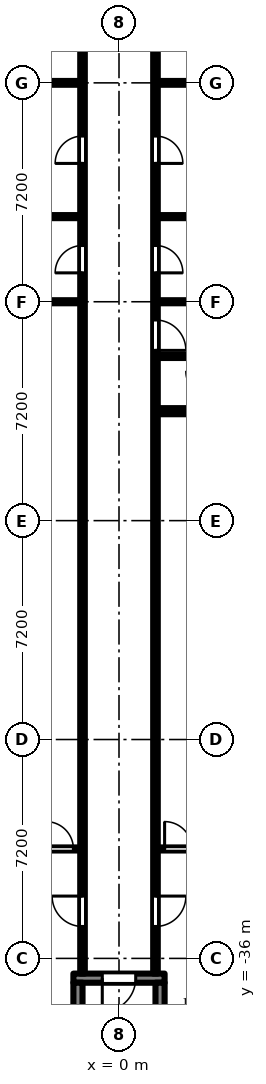
"""IFC4 building model, lengths in metres.
Left out: names, types, materials, properties, quantities, classifications, styles, units other than length and angle.
Written with IfcOpenShell. Run it as: python <this file> out.ifc"""

import sys

from ifc_helpers import new_model, si_unit, direction, frame, frame_2d, origin, place, context, subcontext, project, spatial, rectangle, extrude, element, fill, save


model = new_model("IFC4")
c1 = context("Model", 3, precision=1e-05, world=origin(), true_north=direction((0.0, 1.0)))
c2 = subcontext(c1, "Body", "Model", "MODEL_VIEW")
j1 = project(units=[si_unit("LENGTHUNIT", "METRE"), si_unit("PLANEANGLEUNIT", "RADIAN")], contexts=[c1])
p1 = place(None, origin())
s1 = spatial("IfcSite", under=j1, at=p1, CompositionType="ELEMENT")
p2 = place(p1, origin())
s2 = spatial("IfcBuilding", under=s1, at=p2, CompositionType="ELEMENT")
p3 = place(p2, frame((0.0, 0.0, 66.9)))
s3 = spatial("IfcBuildingStorey", under=s2, at=p3, CompositionType="ELEMENT", Elevation=66.9)
p4 = place(p3, frame((-1.5, -36.65, 0.0), z_axis=(0.0, 0.0, 1.0), x_axis=(1.0, 0.0, 0.0)))
e1 = element("IfcWall", 1, at=p4, inside=s3, PredefinedType="SHEAR", context=c2, shape_type="SweptSolid", body=[
    extrude(rectangle(XDim=3.0, YDim=0.3, at=frame_2d((1.5, 0.0))), origin(), (0.0, 0.0, 1.0), 2.575),
])
p5 = place(p4, frame((0.95, 0.0, 0.0)))
e2 = element("IfcOpeningElement", 2, at=p5, cuts=e1, PredefinedType="OPENING", context=c2, shape_type="SweptSolid", body=[
    extrude(rectangle(XDim=1.1, YDim=2.1, at=frame_2d((0.55, 1.05))), frame((0.0, 0.16, 0.0), z_axis=(0.0, -1.0, 0.0), x_axis=(1.0, 0.0, 0.0)), (0.0, 0.0, 1.0), 0.32),
])
for number, where, z_axis, x_axis in (
    (3, (-1.35, -36.8, 0.0), (0.0, 0.0, 1.0), (0.0, -1.0, 0.0)),
    (4, (1.35, -36.8, 0.0), (0.0, 0.0, 1.0), (0.0, -1.0, 0.0)),
):
    element("IfcWall", number, at=place(p3, frame(where, z_axis=z_axis, x_axis=x_axis)), inside=s3, PredefinedType="SHEAR", context=c2, shape_type="SweptSolid", body=[
        extrude(rectangle(XDim=5.8, YDim=0.3, at=frame_2d((2.9, 0.0))), origin(), (0.0, 0.0, 1.0), 2.575),
    ])
p6 = place(p3, frame((-6.9, -32.4, 0.0), z_axis=(0.0, 0.0, 1.0), x_axis=(1.0, 0.0, 0.0)))
e5 = element("IfcWall", 5, at=p6, inside=s3, PredefinedType="PARTITIONING", context=c2, shape_type="SweptSolid", body=[
    extrude(rectangle(XDim=5.625, YDim=0.1, at=frame_2d((2.812, 0.0))), origin(), (0.0, 0.0, 1.0), 2.575),
])
p7 = place(p6, frame((4.5, 0.0, 0.0)))
e6 = element("IfcOpeningElement", 6, at=p7, cuts=e5, PredefinedType="OPENING", context=c2, shape_type="SweptSolid", body=[
    extrude(rectangle(XDim=0.9, YDim=2.1, at=frame_2d((0.45, 1.05))), frame((0.0, 0.06, 0.0), z_axis=(0.0, -1.0, 0.0), x_axis=(1.0, 0.0, 0.0)), (0.0, 0.0, 1.0), 0.12),
])
p8 = place(p3, frame((-3.9, -11.6, 0.0), z_axis=(0.0, 0.0, 1.0), x_axis=(1.0, 0.0, 0.0)))
e7 = element("IfcWall", 7, at=p8, inside=s3, PredefinedType="PARTITIONING", context=c2, shape_type="SweptSolid", body=[
    extrude(rectangle(XDim=2.625, YDim=0.1, at=frame_2d((1.312, 0.0))), origin(), (0.0, 0.0, 1.0), 2.575),
])
p9 = place(p3, frame((-3.9, -7.2, 0.0), z_axis=(0.0, 0.0, 1.0), x_axis=(1.0, 0.0, 0.0)))
e8 = element("IfcWall", 8, at=p9, inside=s3, PredefinedType="PARTITIONING", context=c2, shape_type="SweptSolid", body=[
    extrude(rectangle(XDim=2.625, YDim=0.125, at=frame_2d((1.312, 0.0))), origin(), (0.0, 0.0, 1.0), 2.575),
])
p10 = place(p3, frame((-2.7, -14.4, 0.0), z_axis=(0.0, 0.0, 1.0), x_axis=(1.0, 0.0, 0.0)))
e9 = element("IfcWall", 9, at=p10, inside=s3, PredefinedType="PARTITIONING", context=c2, shape_type="SweptSolid", body=[
    extrude(rectangle(XDim=1.425, YDim=0.1, at=frame_2d((0.712, 0.0))), origin(), (0.0, 0.0, 1.0), 2.575),
])
p11 = place(p3, frame((-1.2, -36.5, 0.0), z_axis=(0.0, 0.0, 1.0), x_axis=(0.0, 1.0, 0.0)))
e10 = element("IfcWall", 10, at=p11, inside=s3, PredefinedType="PARTITIONING", context=c2, shape_type="SweptSolid", body=[
    extrude(rectangle(XDim=35.225, YDim=0.15, at=frame_2d((17.613, 0.0))), origin(), (0.0, 0.0, 1.0), 2.575),
])
p12 = place(p11, frame((31.85, 0.0, 0.0)))
e11 = element("IfcOpeningElement", 11, at=p12, cuts=e10, PredefinedType="OPENING", context=c2, shape_type="SweptSolid", body=[
    extrude(rectangle(XDim=0.9, YDim=2.1, at=frame_2d((0.45, 1.05))), frame((0.0, 0.085, 0.0), z_axis=(0.0, -1.0, 0.0), x_axis=(1.0, 0.0, 0.0)), (0.0, 0.0, 1.0), 0.17),
])
p13 = place(p11, frame((23.05, 0.0, 0.0)))
e12 = element("IfcOpeningElement", 12, at=p13, cuts=e10, PredefinedType="OPENING", context=c2, shape_type="SweptSolid", body=[
    extrude(rectangle(XDim=0.9, YDim=2.1, at=frame_2d((0.45, 1.05))), frame((0.0, 0.085, 0.0), z_axis=(0.0, -1.0, 0.0), x_axis=(1.0, 0.0, 0.0)), (0.0, 0.0, 1.0), 0.17),
])
p14 = place(p11, frame((26.65, 0.0, 0.0)))
e13 = element("IfcOpeningElement", 13, at=p14, cuts=e10, PredefinedType="OPENING", context=c2, shape_type="SweptSolid", body=[
    extrude(rectangle(XDim=0.9, YDim=2.1, at=frame_2d((0.45, 1.05))), frame((0.0, 0.085, 0.0), z_axis=(0.0, -1.0, 0.0), x_axis=(1.0, 0.0, 0.0)), (0.0, 0.0, 1.0), 0.17),
])
p15 = place(p11, frame((1.55, 0.0, 0.0)))
e14 = element("IfcOpeningElement", 14, at=p15, cuts=e10, PredefinedType="OPENING", context=c2, shape_type="SweptSolid", body=[
    extrude(rectangle(XDim=1.0, YDim=2.1, at=frame_2d((0.5, 1.05))), frame((0.0, 0.085, 0.0), z_axis=(0.0, -1.0, 0.0), x_axis=(1.0, 0.0, 0.0)), (0.0, 0.0, 1.0), 0.17),
])
p16 = place(p3, frame((1.2, -36.5, 0.0), z_axis=(0.0, 0.0, 1.0), x_axis=(0.0, 1.0, 0.0)))
e15 = element("IfcWall", 15, at=p16, inside=s3, PredefinedType="PARTITIONING", context=c2, shape_type="SweptSolid", body=[
    extrude(rectangle(XDim=35.375, YDim=0.15, at=frame_2d((17.688, 0.0))), origin(), (0.0, 0.0, 1.0), 2.575),
])
p17 = place(p16, frame((31.85, 0.0, 0.0)))
e16 = element("IfcOpeningElement", 16, at=p17, cuts=e15, PredefinedType="OPENING", context=c2, shape_type="SweptSolid", body=[
    extrude(rectangle(XDim=0.9, YDim=2.1, at=frame_2d((0.45, 1.05))), frame((0.0, 0.085, 0.0), z_axis=(0.0, -1.0, 0.0), x_axis=(1.0, 0.0, 0.0)), (0.0, 0.0, 1.0), 0.17),
])
p18 = place(p16, frame((23.05, 0.0, 0.0)))
e17 = element("IfcOpeningElement", 17, at=p18, cuts=e15, PredefinedType="OPENING", context=c2, shape_type="SweptSolid", body=[
    extrude(rectangle(XDim=0.9, YDim=2.1, at=frame_2d((0.45, 1.05))), frame((0.0, 0.085, 0.0), z_axis=(0.0, -1.0, 0.0), x_axis=(1.0, 0.0, 0.0)), (0.0, 0.0, 1.0), 0.17),
])
p19 = place(p16, frame((26.65, 0.0, 0.0)))
e18 = element("IfcOpeningElement", 18, at=p19, cuts=e15, PredefinedType="OPENING", context=c2, shape_type="SweptSolid", body=[
    extrude(rectangle(XDim=0.9, YDim=2.1, at=frame_2d((0.45, 1.05))), frame((0.0, 0.085, 0.0), z_axis=(0.0, -1.0, 0.0), x_axis=(1.0, 0.0, 0.0)), (0.0, 0.0, 1.0), 0.17),
])
p20 = place(p16, frame((20.5, 0.0, 0.0)))
e19 = element("IfcOpeningElement", 19, at=p20, cuts=e15, PredefinedType="OPENING", context=c2, shape_type="SweptSolid", body=[
    extrude(rectangle(XDim=1.0, YDim=2.1, at=frame_2d((0.5, 1.05))), frame((0.0, 0.085, 0.0), z_axis=(0.0, -1.0, 0.0), x_axis=(1.0, 0.0, 0.0)), (0.0, 0.0, 1.0), 0.17),
])
p21 = place(p16, frame((1.55, 0.0, 0.0)))
e20 = element("IfcOpeningElement", 20, at=p21, cuts=e15, PredefinedType="OPENING", context=c2, shape_type="SweptSolid", body=[
    extrude(rectangle(XDim=1.0, YDim=2.1, at=frame_2d((0.5, 1.05))), frame((0.0, 0.085, 0.0), z_axis=(0.0, -1.0, 0.0), x_axis=(1.0, 0.0, 0.0)), (0.0, 0.0, 1.0), 0.17),
])
p22 = place(p3, frame((1.275, -32.4, 0.0), z_axis=(0.0, 0.0, 1.0), x_axis=(1.0, 0.0, 0.0)))
e21 = element("IfcWall", 21, at=p22, inside=s3, PredefinedType="PARTITIONING", context=c2, shape_type="SweptSolid", body=[
    extrude(rectangle(XDim=5.625, YDim=0.1, at=frame_2d((2.812, 0.0))), origin(), (0.0, 0.0, 1.0), 2.575),
])
p23 = place(p22, frame((0.225, 0.0, 0.0)))
e22 = element("IfcOpeningElement", 22, at=p23, cuts=e21, PredefinedType="OPENING", context=c2, shape_type="SweptSolid", body=[
    extrude(rectangle(XDim=0.9, YDim=2.1, at=frame_2d((0.45, 1.05))), frame((0.0, 0.06, 0.0), z_axis=(0.0, -1.0, 0.0), x_axis=(1.0, 0.0, 0.0)), (0.0, 0.0, 1.0), 0.12),
])
p24 = place(p3, frame((1.275, -18.0, 0.0), z_axis=(0.0, 0.0, 1.0), x_axis=(1.0, 0.0, 0.0)))
e23 = element("IfcWall", 23, at=p24, inside=s3, PredefinedType="PARTITIONING", context=c2, shape_type="SweptSolid", body=[
    extrude(rectangle(XDim=1.475, YDim=0.2, at=frame_2d((0.738, 0.0))), origin(), (0.0, 0.0, 1.0), 2.575),
])
p25 = place(p3, frame((1.275, -16.2, 0.0), z_axis=(0.0, 0.0, 1.0), x_axis=(1.0, 0.0, 0.0)))
e24 = element("IfcWall", 24, at=p25, inside=s3, PredefinedType="PARTITIONING", context=c2, shape_type="SweptSolid", body=[
    extrude(rectangle(XDim=1.775, YDim=0.1, at=frame_2d((0.888, 0.0))), origin(), (0.0, 0.0, 1.0), 2.575),
])
for number, where, z_axis, x_axis in (
    (25, (1.275, -14.4, 0.0), (0.0, 0.0, 1.0), (1.0, 0.0, 0.0)),
    (26, (1.275, -11.6, 0.0), (0.0, 0.0, 1.0), (1.0, 0.0, 0.0)),
):
    element("IfcWall", number, at=place(p3, frame(where, z_axis=z_axis, x_axis=x_axis)), inside=s3, PredefinedType="PARTITIONING", context=c2, shape_type="SweptSolid", body=[
        extrude(rectangle(XDim=2.625, YDim=0.1, at=frame_2d((1.312, 0.0))), origin(), (0.0, 0.0, 1.0), 2.575),
    ])
p26 = place(p3, frame((1.275, -7.2, 0.0), z_axis=(0.0, 0.0, 1.0), x_axis=(1.0, 0.0, 0.0)))
e27 = element("IfcWall", 27, at=p26, inside=s3, PredefinedType="PARTITIONING", context=c2, shape_type="SweptSolid", body=[
    extrude(rectangle(XDim=2.625, YDim=0.125, at=frame_2d((1.312, 0.0))), origin(), (0.0, 0.0, 1.0), 2.575),
])
p27 = place(p5, frame((1.1, 0.0, 0.0), z_axis=(0.0, 0.0, 1.0), x_axis=(-1.0, 0.0, 0.0)))
e28 = element("IfcDoor", 28, at=p27, inside=s3, OperationType="SINGLE_SWING_RIGHT", PredefinedType="DOOR", context=c2, shape_type="SweptSolid", body=[
    extrude(rectangle(XDim=1.1, YDim=2.1, at=frame_2d((0.55, 1.05))), frame((0.0, 0.025, 0.0), z_axis=(0.0, -1.0, 0.0), x_axis=(1.0, 0.0, 0.0)), (0.0, 0.0, 1.0), 0.05),
])
fill(e2, e28)
p28 = place(p18, frame((0.9, 0.0, 0.0), z_axis=(0.0, 0.0, 1.0), x_axis=(-1.0, 0.0, 0.0)))
e29 = element("IfcDoor", 29, at=p28, inside=s3, OperationType="SINGLE_SWING_RIGHT", PredefinedType="DOOR", context=c2, shape_type="SweptSolid", body=[
    extrude(rectangle(XDim=0.9, YDim=2.1, at=frame_2d((0.45, 1.05))), frame((0.0, 0.025, 0.0), z_axis=(0.0, -1.0, 0.0), x_axis=(1.0, 0.0, 0.0)), (0.0, 0.0, 1.0), 0.05),
])
fill(e17, e29)
p29 = place(p19, frame((0.9, 0.0, 0.0), z_axis=(0.0, 0.0, 1.0), x_axis=(-1.0, 0.0, 0.0)))
e30 = element("IfcDoor", 30, at=p29, inside=s3, OperationType="SINGLE_SWING_RIGHT", PredefinedType="DOOR", context=c2, shape_type="SweptSolid", body=[
    extrude(rectangle(XDim=0.9, YDim=2.1, at=frame_2d((0.45, 1.05))), frame((0.0, 0.025, 0.0), z_axis=(0.0, -1.0, 0.0), x_axis=(1.0, 0.0, 0.0)), (0.0, 0.0, 1.0), 0.05),
])
fill(e18, e30)
p30 = place(p20, frame((1.0, 0.0, 0.0), z_axis=(0.0, 0.0, 1.0), x_axis=(-1.0, 0.0, 0.0)))
e31 = element("IfcDoor", 31, at=p30, inside=s3, OperationType="SINGLE_SWING_RIGHT", PredefinedType="DOOR", context=c2, shape_type="SweptSolid", body=[
    extrude(rectangle(XDim=1.0, YDim=2.1, at=frame_2d((0.5, 1.05))), frame((0.0, 0.025, 0.0), z_axis=(0.0, -1.0, 0.0), x_axis=(1.0, 0.0, 0.0)), (0.0, 0.0, 1.0), 0.05),
])
fill(e19, e31)
p31 = place(p21, frame((1.0, 0.0, 0.0), z_axis=(0.0, 0.0, 1.0), x_axis=(-1.0, 0.0, 0.0)))
e32 = element("IfcDoor", 32, at=p31, inside=s3, OperationType="SINGLE_SWING_LEFT", PredefinedType="DOOR", context=c2, shape_type="SweptSolid", body=[
    extrude(rectangle(XDim=1.0, YDim=2.1, at=frame_2d((0.5, 1.05))), frame((0.0, 0.025, 0.0), z_axis=(0.0, -1.0, 0.0), x_axis=(1.0, 0.0, 0.0)), (0.0, 0.0, 1.0), 0.05),
])
fill(e20, e32)
p32 = place(p23, origin())
e33 = element("IfcDoor", 33, at=p32, inside=s3, OperationType="SINGLE_SWING_LEFT", PredefinedType="DOOR", context=c2, shape_type="SweptSolid", body=[
    extrude(rectangle(XDim=0.9, YDim=2.1, at=frame_2d((0.45, 1.05))), frame((0.0, 0.025, 0.0), z_axis=(0.0, -1.0, 0.0), x_axis=(1.0, 0.0, 0.0)), (0.0, 0.0, 1.0), 0.05),
])
fill(e22, e33)
p33 = place(p13, origin())
e34 = element("IfcDoor", 34, at=p33, inside=s3, OperationType="SINGLE_SWING_LEFT", PredefinedType="DOOR", context=c2, shape_type="SweptSolid", body=[
    extrude(rectangle(XDim=0.9, YDim=2.1, at=frame_2d((0.45, 1.05))), frame((0.0, 0.025, 0.0), z_axis=(0.0, -1.0, 0.0), x_axis=(1.0, 0.0, 0.0)), (0.0, 0.0, 1.0), 0.05),
])
fill(e12, e34)
p34 = place(p14, origin())
e35 = element("IfcDoor", 35, at=p34, inside=s3, OperationType="SINGLE_SWING_LEFT", PredefinedType="DOOR", context=c2, shape_type="SweptSolid", body=[
    extrude(rectangle(XDim=0.9, YDim=2.1, at=frame_2d((0.45, 1.05))), frame((0.0, 0.025, 0.0), z_axis=(0.0, -1.0, 0.0), x_axis=(1.0, 0.0, 0.0)), (0.0, 0.0, 1.0), 0.05),
])
fill(e13, e35)
p35 = place(p15, origin())
e36 = element("IfcDoor", 36, at=p35, inside=s3, OperationType="SINGLE_SWING_RIGHT", PredefinedType="DOOR", context=c2, shape_type="SweptSolid", body=[
    extrude(rectangle(XDim=1.0, YDim=2.1, at=frame_2d((0.5, 1.05))), frame((0.0, 0.025, 0.0), z_axis=(0.0, -1.0, 0.0), x_axis=(1.0, 0.0, 0.0)), (0.0, 0.0, 1.0), 0.05),
])
fill(e14, e36)
p36 = place(p7, origin())
e37 = element("IfcDoor", 37, at=p36, inside=s3, OperationType="SINGLE_SWING_LEFT", PredefinedType="DOOR", context=c2, shape_type="SweptSolid", body=[
    extrude(rectangle(XDim=0.9, YDim=2.1, at=frame_2d((0.45, 1.05))), frame((0.0, 0.025, 0.0), z_axis=(0.0, -1.0, 0.0), x_axis=(1.0, 0.0, 0.0)), (0.0, 0.0, 1.0), 0.05),
])
fill(e6, e37)
save(model, sys.argv[1])
